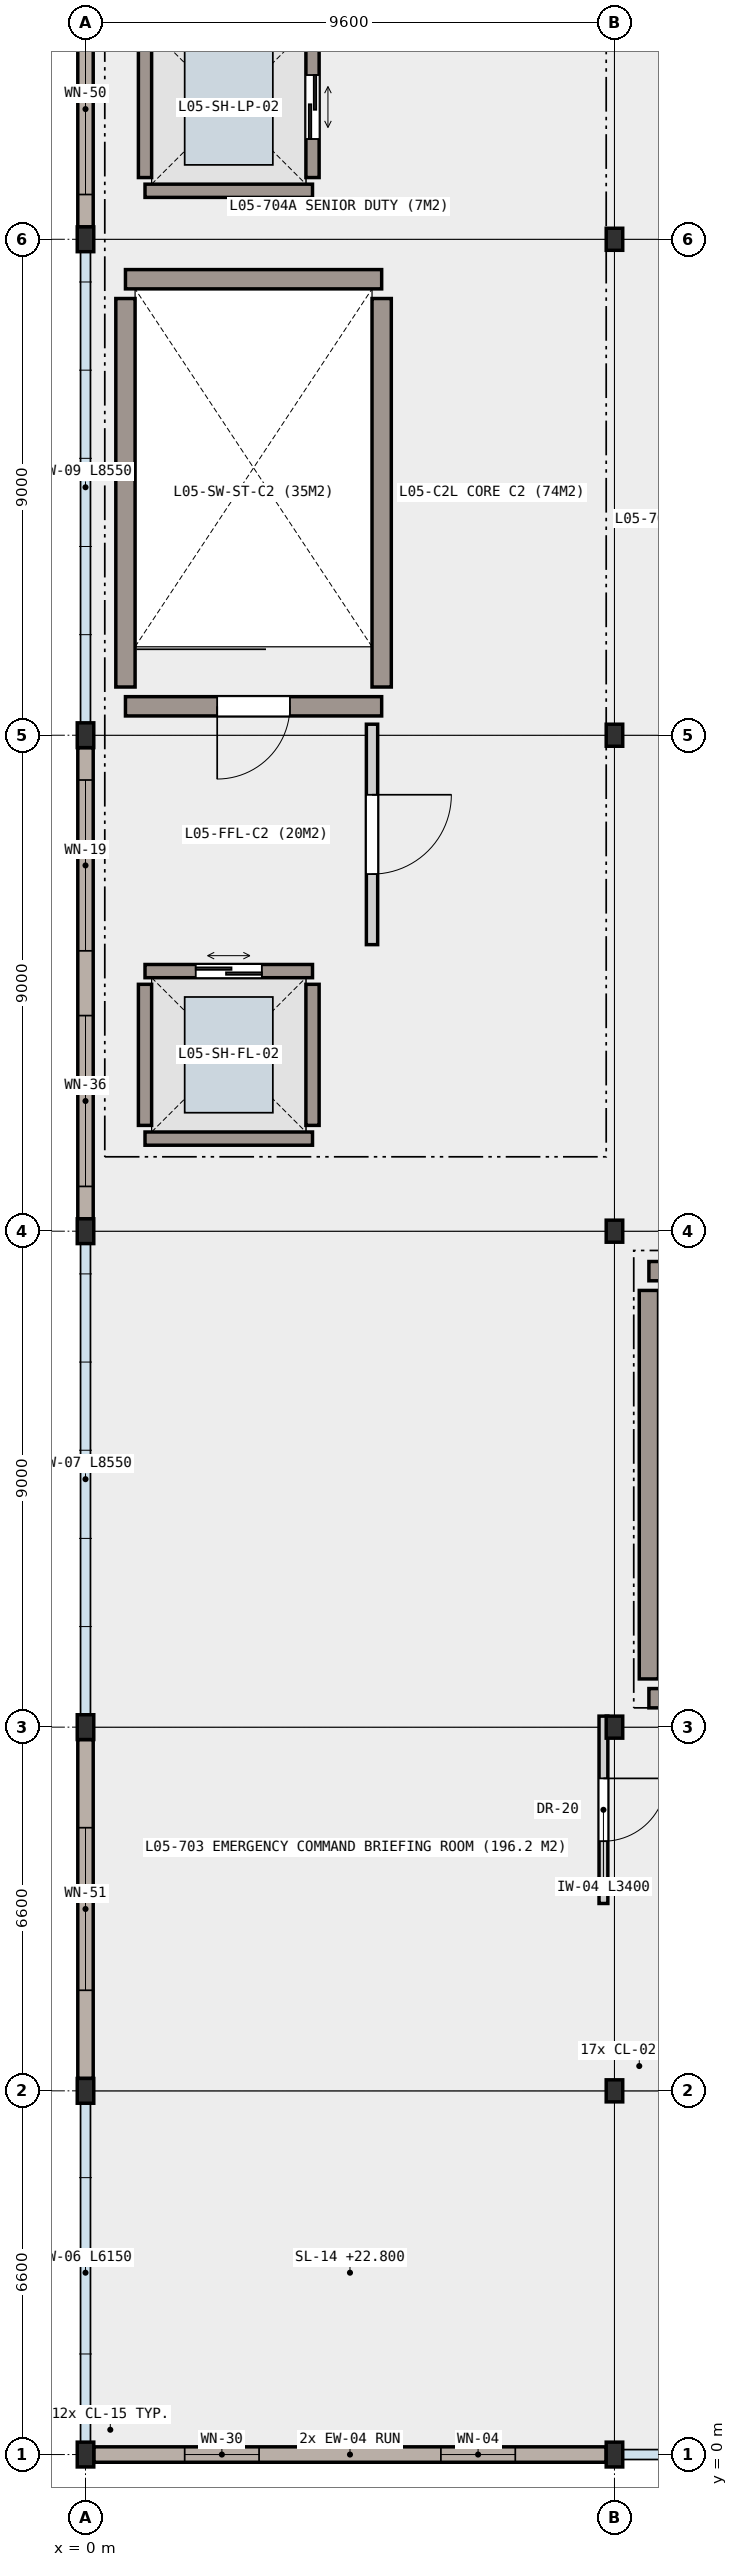
"""IFC4 building model, lengths in metres.
Left out: names, types, materials, properties, quantities, classifications, styles, units other than length and angle.
Written with IfcOpenShell. Run it as: python <this file> out.ifc"""

import sys

from ifc_helpers import new_model, si_unit, direction, frame, frame_2d, origin, origin_2d, place, context, subcontext, project, spatial, rectangle, i_section, extrude, element, fill, save


model = new_model("IFC4")
c1 = context("Model", 3, precision=1e-05, world=origin(), true_north=direction((0.0, 1.0)))
c2 = subcontext(c1, "Body", "Model", "MODEL_VIEW")
j1 = project(units=[si_unit("LENGTHUNIT", "METRE"), si_unit("PLANEANGLEUNIT", "RADIAN")], contexts=[c1])
p1 = place(None, origin())
s1 = spatial("IfcSite", under=j1, at=p1, CompositionType="ELEMENT")
p2 = place(p1, origin())
s2 = spatial("IfcBuilding", under=s1, at=p2, CompositionType="ELEMENT")
p3 = place(p2, frame((0.0, 0.0, 22.8)))
s3 = spatial("IfcBuildingStorey", under=s2, at=p3, CompositionType="ELEMENT", Elevation=22.8)
for number, where, z_axis, x_axis in (
    (1, (0.0, 0.0, 0.0), (0.0, 0.0, 1.0), (1.0, 0.0, 0.0)),
    (2, (0.0, 6.6, 0.0), (0.0, 0.0, 1.0), (1.0, 0.0, 0.0)),
    (3, (0.0, 13.2, 0.0), (0.0, 0.0, 1.0), (1.0, 0.0, 0.0)),
    (4, (0.0, 22.2, 0.0), (0.0, 0.0, 1.0), (1.0, 0.0, 0.0)),
    (5, (0.0, 31.2, 0.0), (0.0, 0.0, 1.0), (1.0, 0.0, 0.0)),
    (6, (0.0, 40.2, 0.0), (0.0, 0.0, 1.0), (1.0, 0.0, 0.0)),
    (7, (9.6, 0.0, 0.0), (0.0, 0.0, 1.0), (1.0, 0.0, 0.0)),
):
    element("IfcColumn", number, at=place(p3, frame(where, z_axis=z_axis, x_axis=x_axis)), inside=s3, PredefinedType="COLUMN", context=c2, shape_type="SweptSolid", body=[
        extrude(i_section(OverallWidth=0.3, OverallDepth=0.45, WebThickness=0.014, FlangeThickness=0.026, FilletRadius=0.027, at=origin_2d()), origin(), (0.0, 0.0, 1.0), 4.2),
    ])
for number, where, z_axis, x_axis in (
    (8, (9.6, 6.6, 0.0), (0.0, 0.0, 1.0), (1.0, 0.0, 0.0)),
    (9, (9.6, 13.2, 0.0), (0.0, 0.0, 1.0), (1.0, 0.0, 0.0)),
    (10, (9.6, 22.2, 0.0), (0.0, 0.0, 1.0), (1.0, 0.0, 0.0)),
    (11, (9.6, 31.2, 0.0), (0.0, 0.0, 1.0), (1.0, 0.0, 0.0)),
    (12, (9.6, 40.2, 0.0), (0.0, 0.0, 1.0), (1.0, 0.0, 0.0)),
):
    element("IfcColumn", number, at=place(p3, frame(where, z_axis=z_axis, x_axis=x_axis)), inside=s3, PredefinedType="COLUMN", context=c2, shape_type="SweptSolid", body=[
        extrude(i_section(OverallWidth=0.3, OverallDepth=0.4, WebThickness=0.013, FlangeThickness=0.024, FilletRadius=0.027, at=origin_2d()), origin(), (0.0, 0.0, 1.0), 4.2),
    ])
p4 = place(p3, frame((0.0, 6.825, 0.0), z_axis=(0.0, 0.0, 1.0), x_axis=(0.0, 1.0, 0.0)))
e13 = element("IfcWall", 13, at=p4, inside=s3, PredefinedType="SOLIDWALL", context=c2, shape_type="SweptSolid", body=[
    extrude(rectangle(XDim=6.15, YDim=0.28, at=frame_2d((3.075, 0.0))), origin(), (0.0, 0.0, 1.0), 3.61),
])
p5 = place(p4, frame((1.6, 0.0, 0.85)))
e14 = element("IfcOpeningElement", 14, at=p5, cuts=e13, PredefinedType="OPENING", context=c2, shape_type="SweptSolid", body=[
    extrude(rectangle(XDim=2.95, YDim=2.15, at=frame_2d((1.475, 1.075))), frame((0.0, 0.15, 0.0), z_axis=(0.0, -1.0, 0.0), x_axis=(1.0, 0.0, 0.0)), (0.0, 0.0, 1.0), 0.3),
])
p6 = place(p3, frame((0.0, 22.425, 0.0), z_axis=(0.0, 0.0, 1.0), x_axis=(0.0, 1.0, 0.0)))
e15 = element("IfcWall", 15, at=p6, inside=s3, PredefinedType="SOLIDWALL", context=c2, shape_type="SweptSolid", body=[
    extrude(rectangle(XDim=8.55, YDim=0.28, at=frame_2d((4.275, 0.0))), origin(), (0.0, 0.0, 1.0), 3.61),
])
p7 = place(p6, frame((0.587, 0.0, 0.85)))
e16 = element("IfcOpeningElement", 16, at=p7, cuts=e15, PredefinedType="OPENING", context=c2, shape_type="SweptSolid", body=[
    extrude(rectangle(XDim=3.1, YDim=1.5, at=frame_2d((1.55, 0.75))), frame((0.0, 0.15, 0.0), z_axis=(0.0, -1.0, 0.0), x_axis=(1.0, 0.0, 0.0)), (0.0, 0.0, 1.0), 0.3),
])
p8 = place(p6, frame((4.863, 0.0, 0.85)))
e17 = element("IfcOpeningElement", 17, at=p8, cuts=e15, PredefinedType="OPENING", context=c2, shape_type="SweptSolid", body=[
    extrude(rectangle(XDim=3.1, YDim=1.85, at=frame_2d((1.55, 0.925))), frame((0.0, 0.15, 0.0), z_axis=(0.0, -1.0, 0.0), x_axis=(1.0, 0.0, 0.0)), (0.0, 0.0, 1.0), 0.3),
])
p9 = place(p3, frame((0.0, 40.425, 0.0), z_axis=(0.0, 0.0, 1.0), x_axis=(0.0, 1.0, 0.0)))
e18 = element("IfcWall", 18, at=p9, inside=s3, PredefinedType="SOLIDWALL", context=c2, shape_type="SweptSolid", body=[
    extrude(rectangle(XDim=8.55, YDim=0.28, at=frame_2d((4.275, 0.0))), origin(), (0.0, 0.0, 1.0), 3.61),
])
p10 = place(p9, frame((0.587, 0.0, 0.85)))
e19 = element("IfcOpeningElement", 19, at=p10, cuts=e18, PredefinedType="OPENING", context=c2, shape_type="SweptSolid", body=[
    extrude(rectangle(XDim=3.1, YDim=2.15, at=frame_2d((1.55, 1.075))), frame((0.0, 0.15, 0.0), z_axis=(0.0, -1.0, 0.0), x_axis=(1.0, 0.0, 0.0)), (0.0, 0.0, 1.0), 0.3),
])
p11 = place(p9, frame((4.762, 0.0, 0.85)))
e20 = element("IfcOpeningElement", 20, at=p11, cuts=e18, PredefinedType="OPENING", context=c2, shape_type="SweptSolid", body=[
    extrude(rectangle(XDim=3.3, YDim=1.5, at=frame_2d((1.65, 0.75))), frame((0.0, 0.15, 0.0), z_axis=(0.0, -1.0, 0.0), x_axis=(1.0, 0.0, 0.0)), (0.0, 0.0, 1.0), 0.3),
])
p12 = place(p3, frame((9.45, 0.0, 0.0), z_axis=(0.0, 0.0, 1.0), x_axis=(-1.0, 0.0, 0.0)))
e21 = element("IfcWall", 21, at=p12, inside=s3, PredefinedType="SOLIDWALL", context=c2, shape_type="SweptSolid", body=[
    extrude(rectangle(XDim=9.3, YDim=0.28, at=frame_2d((4.65, 0.0))), origin(), (0.0, 0.0, 1.0), 3.61),
])
p13 = place(p12, frame((1.65, 0.0, 0.85)))
e22 = element("IfcOpeningElement", 22, at=p13, cuts=e21, PredefinedType="OPENING", context=c2, shape_type="SweptSolid", body=[
    extrude(rectangle(XDim=1.35, YDim=1.85, at=frame_2d((0.675, 0.925))), frame((0.0, 0.15, 0.0), z_axis=(0.0, -1.0, 0.0), x_axis=(1.0, 0.0, 0.0)), (0.0, 0.0, 1.0), 0.3),
])
p14 = place(p12, frame((6.3, 0.0, 0.85)))
e23 = element("IfcOpeningElement", 23, at=p14, cuts=e21, PredefinedType="OPENING", context=c2, shape_type="SweptSolid", body=[
    extrude(rectangle(XDim=1.35, YDim=2.15, at=frame_2d((0.675, 1.075))), frame((0.0, 0.15, 0.0), z_axis=(0.0, -1.0, 0.0), x_axis=(1.0, 0.0, 0.0)), (0.0, 0.0, 1.0), 0.3),
])
p15 = place(p3, frame((4.12, 23.88, 0.0), z_axis=(0.0, 0.0, 1.0), x_axis=(-1.0, 0.0, 0.0)))
e24 = element("IfcWall", 24, at=p15, inside=s3, PredefinedType="SHEAR", context=c2, shape_type="SweptSolid", body=[
    extrude(rectangle(XDim=3.04, YDim=0.24, at=frame_2d((1.52, 0.0))), origin(), (0.0, 0.0, 1.0), 3.99),
])
p16 = place(p3, frame((1.08, 26.92, 0.0), z_axis=(0.0, 0.0, 1.0), x_axis=(1.0, 0.0, 0.0)))
e25 = element("IfcWall", 25, at=p16, inside=s3, PredefinedType="SHEAR", context=c2, shape_type="SweptSolid", body=[
    extrude(rectangle(XDim=3.04, YDim=0.24, at=frame_2d((1.52, 0.0))), origin(), (0.0, 0.0, 1.0), 3.99),
])
p17 = place(p16, frame((0.92, 0.0, 0.0)))
e26 = element("IfcOpeningElement", 26, at=p17, cuts=e25, PredefinedType="OPENING", context=c2, shape_type="SweptSolid", body=[
    extrude(rectangle(XDim=1.2, YDim=2.15, at=frame_2d((0.6, 1.075))), frame((0.0, 0.13, 0.0), z_axis=(0.0, -1.0, 0.0), x_axis=(1.0, 0.0, 0.0)), (0.0, 0.0, 1.0), 0.26),
])
for number, where, z_axis, x_axis in (
    (27, (1.08, 24.12, 0.0), (0.0, 0.0, 1.0), (0.0, 1.0, 0.0)),
    (28, (4.12, 26.68, 0.0), (0.0, 0.0, 1.0), (0.0, -1.0, 0.0)),
):
    element("IfcWall", number, at=place(p3, frame(where, z_axis=z_axis, x_axis=x_axis)), inside=s3, PredefinedType="SHEAR", context=c2, shape_type="SweptSolid", body=[
        extrude(rectangle(XDim=2.56, YDim=0.24, at=frame_2d((1.28, 0.0))), origin(), (0.0, 0.0, 1.0), 3.99),
    ])
p18 = place(p3, frame((4.12, 41.08, 0.0), z_axis=(0.0, 0.0, 1.0), x_axis=(-1.0, 0.0, 0.0)))
e29 = element("IfcWall", 29, at=p18, inside=s3, PredefinedType="SHEAR", context=c2, shape_type="SweptSolid", body=[
    extrude(rectangle(XDim=3.04, YDim=0.24, at=frame_2d((1.52, 0.0))), origin(), (0.0, 0.0, 1.0), 3.99),
])
p19 = place(p3, frame((1.08, 41.32, 0.0), z_axis=(0.0, 0.0, 1.0), x_axis=(0.0, 1.0, 0.0)))
e30 = element("IfcWall", 30, at=p19, inside=s3, PredefinedType="SHEAR", context=c2, shape_type="SweptSolid", body=[
    extrude(rectangle(XDim=2.56, YDim=0.24, at=frame_2d((1.28, 0.0))), origin(), (0.0, 0.0, 1.0), 3.99),
])
p20 = place(p3, frame((4.12, 43.88, 0.0), z_axis=(0.0, 0.0, 1.0), x_axis=(0.0, -1.0, 0.0)))
e31 = element("IfcWall", 31, at=p20, inside=s3, PredefinedType="SHEAR", context=c2, shape_type="SweptSolid", body=[
    extrude(rectangle(XDim=2.56, YDim=0.24, at=frame_2d((1.28, 0.0))), origin(), (0.0, 0.0, 1.0), 3.99),
])
p21 = place(p20, frame((0.7, 0.0, 0.0)))
e32 = element("IfcOpeningElement", 32, at=p21, cuts=e31, PredefinedType="OPENING", context=c2, shape_type="SweptSolid", body=[
    extrude(rectangle(XDim=1.16, YDim=2.15, at=frame_2d((0.58, 1.075))), frame((0.0, 0.13, 0.0), z_axis=(0.0, -1.0, 0.0), x_axis=(1.0, 0.0, 0.0)), (0.0, 0.0, 1.0), 0.26),
])
p22 = place(p3, frame((14.875, 13.725, 0.0), z_axis=(0.0, 0.0, 1.0), x_axis=(-1.0, 0.0, 0.0)))
e33 = element("IfcWall", 33, at=p22, inside=s3, PredefinedType="SHEAR", context=c2, shape_type="SweptSolid", body=[
    extrude(rectangle(XDim=4.65, YDim=0.35, at=frame_2d((2.325, 0.0))), origin(), (0.0, 0.0, 1.0), 3.99),
])
p23 = place(p22, frame((1.665, 0.0, 0.0)))
e34 = element("IfcOpeningElement", 34, at=p23, cuts=e33, PredefinedType="OPENING", context=c2, shape_type="SweptSolid", body=[
    extrude(rectangle(XDim=1.32, YDim=2.15, at=frame_2d((0.66, 1.075))), frame((0.0, 0.185, 0.0), z_axis=(0.0, -1.0, 0.0), x_axis=(1.0, 0.0, 0.0)), (0.0, 0.0, 1.0), 0.37),
])
p24 = place(p3, frame((10.225, 21.475, 0.0), z_axis=(0.0, 0.0, 1.0), x_axis=(1.0, 0.0, 0.0)))
e35 = element("IfcWall", 35, at=p24, inside=s3, PredefinedType="SHEAR", context=c2, shape_type="SweptSolid", body=[
    extrude(rectangle(XDim=4.825, YDim=0.35, at=frame_2d((2.413, 0.0))), origin(), (0.0, 0.0, 1.0), 3.99),
])
p25 = place(p3, frame((10.225, 14.075, 0.0), z_axis=(0.0, 0.0, 1.0), x_axis=(0.0, 1.0, 0.0)))
e36 = element("IfcWall", 36, at=p25, inside=s3, PredefinedType="SHEAR", context=c2, shape_type="SweptSolid", body=[
    extrude(rectangle(XDim=7.05, YDim=0.35, at=frame_2d((3.525, 0.0))), origin(), (0.0, 0.0, 1.0), 3.99),
])
p26 = place(p3, frame((5.375, 31.725, 0.0), z_axis=(0.0, 0.0, 1.0), x_axis=(-1.0, 0.0, 0.0)))
e37 = element("IfcWall", 37, at=p26, inside=s3, PredefinedType="SHEAR", context=c2, shape_type="SweptSolid", body=[
    extrude(rectangle(XDim=4.65, YDim=0.35, at=frame_2d((2.325, 0.0))), origin(), (0.0, 0.0, 1.0), 3.99),
])
p27 = place(p26, frame((1.665, 0.0, 0.0)))
e38 = element("IfcOpeningElement", 38, at=p27, cuts=e37, PredefinedType="OPENING", context=c2, shape_type="SweptSolid", body=[
    extrude(rectangle(XDim=1.32, YDim=2.15, at=frame_2d((0.66, 1.075))), frame((0.0, 0.185, 0.0), z_axis=(0.0, -1.0, 0.0), x_axis=(1.0, 0.0, 0.0)), (0.0, 0.0, 1.0), 0.37),
])
p28 = place(p3, frame((0.725, 39.475, 0.0), z_axis=(0.0, 0.0, 1.0), x_axis=(1.0, 0.0, 0.0)))
e39 = element("IfcWall", 39, at=p28, inside=s3, PredefinedType="SHEAR", context=c2, shape_type="SweptSolid", body=[
    extrude(rectangle(XDim=4.65, YDim=0.35, at=frame_2d((2.325, 0.0))), origin(), (0.0, 0.0, 1.0), 3.99),
])
for number, where, z_axis, x_axis in (
    (40, (0.725, 32.075, 0.0), (0.0, 0.0, 1.0), (0.0, 1.0, 0.0)),
    (41, (5.375, 39.125, 0.0), (0.0, 0.0, 1.0), (0.0, -1.0, 0.0)),
):
    element("IfcWall", number, at=place(p3, frame(where, z_axis=z_axis, x_axis=x_axis)), inside=s3, PredefinedType="SHEAR", context=c2, shape_type="SweptSolid", body=[
        extrude(rectangle(XDim=7.05, YDim=0.35, at=frame_2d((3.525, 0.0))), origin(), (0.0, 0.0, 1.0), 3.99),
    ])
p29 = place(p3, frame((5.2, 31.4, 0.0), z_axis=(0.0, 0.0, 1.0), x_axis=(0.0, -1.0, 0.0)))
e42 = element("IfcWall", 42, at=p29, inside=s3, PredefinedType="PARTITIONING", context=c2, shape_type="SweptSolid", body=[
    extrude(rectangle(XDim=4.0, YDim=0.205, at=frame_2d((2.0, 0.0))), origin(), (0.0, 0.0, 1.0), 3.99),
])
p30 = place(p29, frame((1.28, 0.0, 0.0)))
e43 = element("IfcOpeningElement", 43, at=p30, cuts=e42, PredefinedType="OPENING", context=c2, shape_type="SweptSolid", body=[
    extrude(rectangle(XDim=1.44, YDim=2.18, at=frame_2d((0.72, 1.09))), frame((0.0, 0.113, 0.0), z_axis=(0.0, -1.0, 0.0), x_axis=(1.0, 0.0, 0.0)), (0.0, 0.0, 1.0), 0.225),
])
p31 = place(p3, frame((9.4, 13.4, 0.0), z_axis=(0.0, 0.0, 1.0), x_axis=(0.0, -1.0, 0.0)))
e44 = element("IfcWall", 44, at=p31, inside=s3, PredefinedType="PARTITIONING", context=c2, shape_type="SweptSolid", body=[
    extrude(rectangle(XDim=3.4, YDim=0.16, at=frame_2d((1.7, 0.0))), origin(), (0.0, 0.0, 1.0), 3.57),
])
p32 = place(p31, frame((1.13, 0.0, 0.0)))
e45 = element("IfcOpeningElement", 45, at=p32, cuts=e44, PredefinedType="OPENING", context=c2, shape_type="SweptSolid", body=[
    extrude(rectangle(XDim=1.14, YDim=2.16, at=frame_2d((0.57, 1.08))), frame((0.0, 0.09, 0.0), z_axis=(0.0, -1.0, 0.0), x_axis=(1.0, 0.0, 0.0)), (0.0, 0.0, 1.0), 0.18),
])
p33 = place(p5, origin())
e46 = element("IfcWindow", 46, at=p33, inside=s3, PartitioningType="SINGLE_PANEL", PredefinedType="WINDOW", context=c2, shape_type="SweptSolid", body=[
    extrude(rectangle(XDim=2.95, YDim=2.15, at=frame_2d((1.475, 1.075))), frame((0.0, 0.03, 0.0), z_axis=(0.0, -1.0, 0.0), x_axis=(1.0, 0.0, 0.0)), (0.0, 0.0, 1.0), 0.06),
])
fill(e14, e46)
p34 = place(p7, origin())
e47 = element("IfcWindow", 47, at=p34, inside=s3, PartitioningType="SINGLE_PANEL", PredefinedType="WINDOW", context=c2, shape_type="SweptSolid", body=[
    extrude(rectangle(XDim=3.1, YDim=1.5, at=frame_2d((1.55, 0.75))), frame((0.0, 0.03, 0.0), z_axis=(0.0, -1.0, 0.0), x_axis=(1.0, 0.0, 0.0)), (0.0, 0.0, 1.0), 0.06),
])
fill(e16, e47)
p35 = place(p8, origin())
e48 = element("IfcWindow", 48, at=p35, inside=s3, PartitioningType="SINGLE_PANEL", PredefinedType="WINDOW", context=c2, shape_type="SweptSolid", body=[
    extrude(rectangle(XDim=3.1, YDim=1.85, at=frame_2d((1.55, 0.925))), frame((0.0, 0.03, 0.0), z_axis=(0.0, -1.0, 0.0), x_axis=(1.0, 0.0, 0.0)), (0.0, 0.0, 1.0), 0.06),
])
fill(e17, e48)
p36 = place(p10, origin())
e49 = element("IfcWindow", 49, at=p36, inside=s3, PartitioningType="SINGLE_PANEL", PredefinedType="WINDOW", context=c2, shape_type="SweptSolid", body=[
    extrude(rectangle(XDim=3.1, YDim=2.15, at=frame_2d((1.55, 1.075))), frame((0.0, 0.03, 0.0), z_axis=(0.0, -1.0, 0.0), x_axis=(1.0, 0.0, 0.0)), (0.0, 0.0, 1.0), 0.06),
])
fill(e19, e49)
p37 = place(p13, origin())
e50 = element("IfcWindow", 50, at=p37, inside=s3, PartitioningType="SINGLE_PANEL", PredefinedType="WINDOW", context=c2, shape_type="SweptSolid", body=[
    extrude(rectangle(XDim=1.35, YDim=1.85, at=frame_2d((0.675, 0.925))), frame((0.0, 0.03, 0.0), z_axis=(0.0, -1.0, 0.0), x_axis=(1.0, 0.0, 0.0)), (0.0, 0.0, 1.0), 0.06),
])
fill(e22, e50)
p38 = place(p14, origin())
e51 = element("IfcWindow", 51, at=p38, inside=s3, PartitioningType="SINGLE_PANEL", PredefinedType="WINDOW", context=c2, shape_type="SweptSolid", body=[
    extrude(rectangle(XDim=1.35, YDim=2.15, at=frame_2d((0.675, 1.075))), frame((0.0, 0.03, 0.0), z_axis=(0.0, -1.0, 0.0), x_axis=(1.0, 0.0, 0.0)), (0.0, 0.0, 1.0), 0.06),
])
fill(e23, e51)
p39 = place(p17, origin())
e52 = element("IfcDoor", 52, at=p39, inside=s3, OperationType="DOUBLE_DOOR_SLIDING", PredefinedType="DOOR", context=c2, shape_type="SweptSolid", body=[
    extrude(rectangle(XDim=1.2, YDim=2.15, at=frame_2d((0.6, 1.075))), frame((0.0, 0.025, 0.0), z_axis=(0.0, -1.0, 0.0), x_axis=(1.0, 0.0, 0.0)), (0.0, 0.0, 1.0), 0.05),
])
fill(e26, e52)
p40 = place(p21, origin())
e53 = element("IfcDoor", 53, at=p40, inside=s3, OperationType="DOUBLE_DOOR_SLIDING", PredefinedType="DOOR", context=c2, shape_type="SweptSolid", body=[
    extrude(rectangle(XDim=1.16, YDim=2.15, at=frame_2d((0.58, 1.075))), frame((0.0, 0.025, 0.0), z_axis=(0.0, -1.0, 0.0), x_axis=(1.0, 0.0, 0.0)), (0.0, 0.0, 1.0), 0.05),
])
fill(e32, e53)
p41 = place(p27, origin())
e54 = element("IfcDoor", 54, at=p41, inside=s3, OperationType="SINGLE_SWING_RIGHT", PredefinedType="DOOR", context=c2, shape_type="SweptSolid", body=[
    extrude(rectangle(XDim=1.32, YDim=2.15, at=frame_2d((0.66, 1.075))), frame((0.0, 0.025, 0.0), z_axis=(0.0, -1.0, 0.0), x_axis=(1.0, 0.0, 0.0)), (0.0, 0.0, 1.0), 0.05),
])
fill(e38, e54)
p42 = place(p30, origin())
e55 = element("IfcDoor", 55, at=p42, inside=s3, OperationType="SINGLE_SWING_LEFT", PredefinedType="DOOR", context=c2, shape_type="SweptSolid", body=[
    extrude(rectangle(XDim=1.44, YDim=2.18, at=frame_2d((0.72, 1.09))), frame((0.0, 0.025, 0.0), z_axis=(0.0, -1.0, 0.0), x_axis=(1.0, 0.0, 0.0)), (0.0, 0.0, 1.0), 0.05),
])
fill(e43, e55)
p43 = place(p32, origin())
e56 = element("IfcDoor", 56, at=p43, inside=s3, OperationType="SINGLE_SWING_LEFT", PredefinedType="DOOR", context=c2, shape_type="SweptSolid", body=[
    extrude(rectangle(XDim=1.14, YDim=2.16, at=frame_2d((0.57, 1.08))), frame((0.0, 0.025, 0.0), z_axis=(0.0, -1.0, 0.0), x_axis=(1.0, 0.0, 0.0)), (0.0, 0.0, 1.0), 0.05),
])
fill(e45, e56)
save(model, sys.argv[1])
